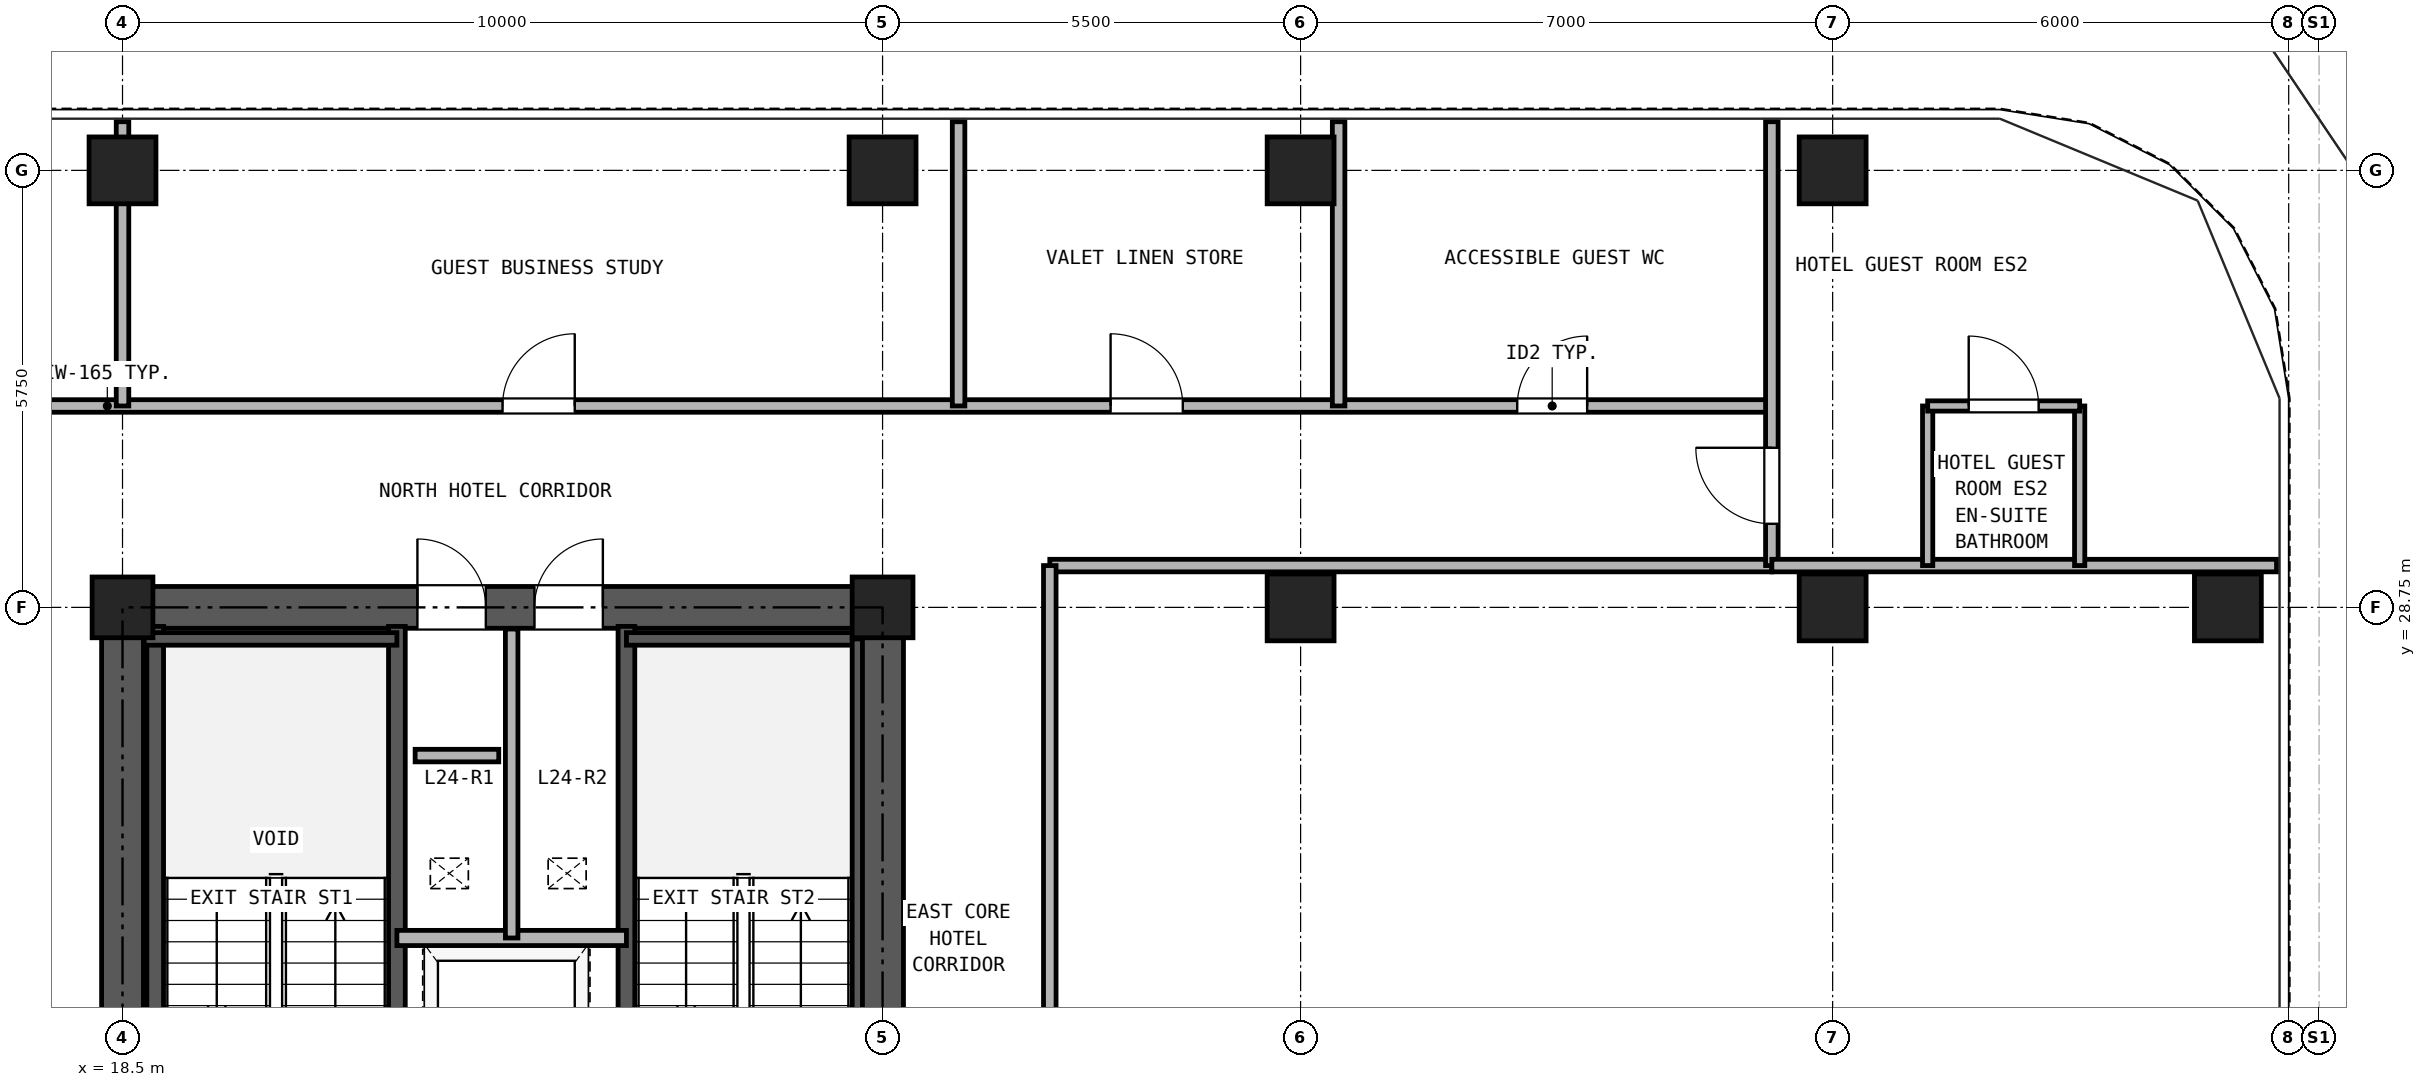
"""IFC4 building model, lengths in metres.
Left out: names, types, materials, properties, quantities, classifications, styles, units other than length and angle.
Written with IfcOpenShell. Run it as: python <this file> out.ifc"""

import sys

from ifc_helpers import new_model, si_unit, direction, frame, frame_2d, origin, origin_2d, place, context, subcontext, project, spatial, rectangle, hollow_rectangle, extrude, source, transform, mapped, element, fill, save


model = new_model("IFC4")
c1 = context("Model", 3, precision=1e-05, world=origin(), true_north=direction((0.0, 1.0)))
c2 = subcontext(c1, "Body", "Model", "MODEL_VIEW")
j1 = project(units=[si_unit("LENGTHUNIT", "METRE"), si_unit("PLANEANGLEUNIT", "RADIAN")], contexts=[c1])
p1 = place(None, origin())
s1 = spatial("IfcSite", under=j1, at=p1, CompositionType="ELEMENT")
p2 = place(p1, origin())
s2 = spatial("IfcBuilding", under=s1, at=p2, CompositionType="ELEMENT")
p3 = place(p2, frame((0.0, 0.0, 92.7)))
s3 = spatial("IfcBuildingStorey", under=s2, at=p3, CompositionType="ELEMENT", Elevation=92.7)
m1 = source(origin(), c2, "Body", "SweptSolid", [
    extrude(hollow_rectangle(XDim=0.88, YDim=0.88, WallThickness=0.05, at=origin_2d()), origin(), (0.0, 0.0, 1.0), 2.95),
])
for number, where, z_axis, x_axis in (
    (1, (18.5, 34.5, 0.0), (0.0, 0.0, 1.0), (1.0, 0.0, 0.0)),
    (2, (28.5, 34.5, 0.0), (0.0, 0.0, 1.0), (1.0, 0.0, 0.0)),
    (3, (34.0, 34.5, 0.0), (0.0, 0.0, 1.0), (1.0, 0.0, 0.0)),
    (4, (41.0, 34.5, 0.0), (0.0, 0.0, 1.0), (1.0, 0.0, 0.0)),
    (5, (46.2, 28.75, 0.0), (0.0, 0.0, 1.0), (1.0, 0.0, 0.0)),
):
    element("IfcColumn", number, at=place(p3, frame(where, z_axis=z_axis, x_axis=x_axis)), inside=s3, PredefinedType="COLUMN", context=c2, shape_type="MappedRepresentation", body=[
        mapped(m1, transform((0.0, 0.0, 0.0), x_axis=(1.0, 0.0, 0.0), y_axis=(0.0, 1.0, 0.0), z_axis=(0.0, 0.0, 1.0), scale=1.0)),
    ])
m2 = source(origin(), c2, "Body", "SweptSolid", [
    extrude(hollow_rectangle(XDim=0.8, YDim=0.8, WallThickness=0.045, at=origin_2d()), origin(), (0.0, 0.0, 1.0), 2.95),
])
for number, where, z_axis, x_axis in (
    (6, (18.5, 28.75, 0.0), (0.0, 0.0, 1.0), (1.0, 0.0, 0.0)),
    (7, (28.5, 28.75, 0.0), (0.0, 0.0, 1.0), (1.0, 0.0, 0.0)),
):
    element("IfcColumn", number, at=place(p3, frame(where, z_axis=z_axis, x_axis=x_axis)), inside=s3, PredefinedType="COLUMN", context=c2, shape_type="MappedRepresentation", body=[
        mapped(m2, transform((0.0, 0.0, 0.0), x_axis=(1.0, 0.0, 0.0), y_axis=(0.0, 1.0, 0.0), z_axis=(0.0, 0.0, 1.0), scale=1.0)),
    ])
for number, where, z_axis, x_axis in (
    (8, (34.0, 28.75, 0.0), (0.0, 0.0, 1.0), (1.0, 0.0, 0.0)),
    (9, (41.0, 28.75, 0.0), (0.0, 0.0, 1.0), (1.0, 0.0, 0.0)),
):
    element("IfcColumn", number, at=place(p3, frame(where, z_axis=z_axis, x_axis=x_axis)), inside=s3, PredefinedType="COLUMN", context=c2, shape_type="MappedRepresentation", body=[
        mapped(m1, transform((0.0, 0.0, 0.0), x_axis=(1.0, 0.0, 0.0), y_axis=(0.0, 1.0, 0.0), z_axis=(0.0, 0.0, 1.0), scale=1.0)),
    ])
p4 = place(p3, frame((18.225, 28.75, 0.0), z_axis=(0.0, 0.0, 1.0), x_axis=(1.0, 0.0, 0.0)))
e10 = element("IfcWall", 10, at=p4, inside=s3, PredefinedType="SHEAR", context=c2, shape_type="SweptSolid", body=[
    extrude(rectangle(XDim=10.55, YDim=0.55, at=frame_2d((5.275, 0.0))), origin(), (0.0, 0.0, 1.0), 2.95),
])
p5 = place(p4, frame((4.155, 0.0, 0.0)))
e11 = element("IfcOpeningElement", 11, at=p5, cuts=e10, PredefinedType="OPENING", context=c2, shape_type="SweptSolid", body=[
    extrude(rectangle(XDim=0.9, YDim=2.05, at=frame_2d((0.45, 1.025))), frame((0.0, 0.285, 0.0), z_axis=(0.0, -1.0, 0.0), x_axis=(1.0, 0.0, 0.0)), (0.0, 0.0, 1.0), 0.57),
])
p6 = place(p4, frame((5.695, 0.0, 0.0)))
e12 = element("IfcOpeningElement", 12, at=p6, cuts=e10, PredefinedType="OPENING", context=c2, shape_type="SweptSolid", body=[
    extrude(rectangle(XDim=0.9, YDim=2.05, at=frame_2d((0.45, 1.025))), frame((0.0, 0.285, 0.0), z_axis=(0.0, -1.0, 0.0), x_axis=(1.0, 0.0, 0.0)), (0.0, 0.0, 1.0), 0.57),
])
p7 = place(p3, frame((18.5, 11.775, 0.0), z_axis=(0.0, 0.0, 1.0), x_axis=(0.0, 1.0, 0.0)))
e13 = element("IfcWall", 13, at=p7, inside=s3, PredefinedType="SHEAR", context=c2, shape_type="SweptSolid", body=[
    extrude(rectangle(XDim=16.7, YDim=0.55, at=frame_2d((8.35, 0.0))), origin(), (0.0, 0.0, 1.0), 2.95),
])
p8 = place(p7, frame((7.375, 0.0, 0.0)))
e14 = element("IfcOpeningElement", 14, at=p8, cuts=e13, PredefinedType="OPENING", context=c2, shape_type="SweptSolid", body=[
    extrude(rectangle(XDim=1.15, YDim=2.2, at=frame_2d((0.575, 1.1))), frame((0.0, 0.285, 0.0), z_axis=(0.0, -1.0, 0.0), x_axis=(1.0, 0.0, 0.0)), (0.0, 0.0, 1.0), 0.57),
])
p9 = place(p3, frame((28.5, 11.775, 0.0), z_axis=(0.0, 0.0, 1.0), x_axis=(0.0, 1.0, 0.0)))
e15 = element("IfcWall", 15, at=p9, inside=s3, PredefinedType="SHEAR", context=c2, shape_type="SweptSolid", body=[
    extrude(rectangle(XDim=16.7, YDim=0.55, at=frame_2d((8.35, 0.0))), origin(), (0.0, 0.0, 1.0), 2.95),
])
p10 = place(p9, frame((7.375, 0.0, 0.0)))
e16 = element("IfcOpeningElement", 16, at=p10, cuts=e15, PredefinedType="OPENING", context=c2, shape_type="SweptSolid", body=[
    extrude(rectangle(XDim=1.15, YDim=2.2, at=frame_2d((0.575, 1.1))), frame((0.0, 0.285, 0.0), z_axis=(0.0, -1.0, 0.0), x_axis=(1.0, 0.0, 0.0)), (0.0, 0.0, 1.0), 0.57),
])
for number, where, z_axis, x_axis in (
    (17, (18.93, 21.39, 0.0), (0.0, 0.0, 1.0), (0.0, 1.0, 0.0)),
    (18, (22.11, 21.39, 0.0), (0.0, 0.0, 1.0), (0.0, 1.0, 0.0)),
    (19, (25.13, 21.39, 0.0), (0.0, 0.0, 1.0), (0.0, 1.0, 0.0)),
):
    element("IfcWall", number, at=place(p3, frame(where, z_axis=z_axis, x_axis=x_axis)), inside=s3, PredefinedType="SOLIDWALL", context=c2, shape_type="SweptSolid", body=[
        extrude(rectangle(XDim=7.11, YDim=0.22, at=frame_2d((3.555, 0.0))), origin(), (0.0, 0.0, 1.0), 2.95),
    ])
p11 = place(p3, frame((18.785, 28.335, 0.0), z_axis=(0.0, 0.0, 1.0), x_axis=(1.0, 0.0, 0.0)))
e20 = element("IfcWall", 20, at=p11, inside=s3, PredefinedType="PARTITIONING", context=c2, shape_type="SweptSolid", body=[
    extrude(rectangle(XDim=3.325, YDim=0.165, at=frame_2d((1.663, 0.0))), origin(), (0.0, 0.0, 1.0), 2.95),
])
p12 = place(p3, frame((25.13, 28.335, 0.0), z_axis=(0.0, 0.0, 1.0), x_axis=(1.0, 0.0, 0.0)))
e21 = element("IfcWall", 21, at=p12, inside=s3, PredefinedType="PARTITIONING", context=c2, shape_type="SweptSolid", body=[
    extrude(rectangle(XDim=3.085, YDim=0.165, at=frame_2d((1.542, 0.0))), origin(), (0.0, 0.0, 1.0), 2.95),
])
p13 = place(p3, frame((28.167, 21.39, 0.0), z_axis=(0.0, 0.0, 1.0), x_axis=(0.0, 1.0, 0.0)))
e22 = element("IfcWall", 22, at=p13, inside=s3, PredefinedType="PARTITIONING", context=c2, shape_type="SweptSolid", body=[
    extrude(rectangle(XDim=6.945, YDim=0.135, at=frame_2d((3.473, 0.0))), origin(), (0.0, 0.0, 1.0), 2.95),
])
p14 = place(p3, frame((22.11, 24.4, 0.0), z_axis=(0.0, 0.0, 1.0), x_axis=(1.0, 0.0, 0.0)))
e23 = element("IfcWall", 23, at=p14, inside=s3, PredefinedType="PARTITIONING", context=c2, shape_type="SweptSolid", body=[
    extrude(rectangle(XDim=3.02, YDim=0.2, at=frame_2d((1.51, 0.0))), origin(), (0.0, 0.0, 1.0), 2.95),
])
p15 = place(p3, frame((23.62, 24.4, 0.0), z_axis=(0.0, 0.0, 1.0), x_axis=(0.0, 1.0, 0.0)))
e24 = element("IfcWall", 24, at=p15, inside=s3, PredefinedType="PARTITIONING", context=c2, shape_type="SweptSolid", body=[
    extrude(rectangle(XDim=4.065, YDim=0.165, at=frame_2d((2.033, 0.0))), origin(), (0.0, 0.0, 1.0), 2.95),
])
p16 = place(p3, frame((6.8, 31.4, 0.0), z_axis=(0.0, 0.0, 1.0), x_axis=(1.0, 0.0, 0.0)))
e25 = element("IfcWall", 25, at=p16, inside=s3, PredefinedType="PARTITIONING", context=c2, shape_type="SweptSolid", body=[
    extrude(rectangle(XDim=33.4, YDim=0.165, at=frame_2d((16.7, 0.0))), origin(), (0.0, 0.0, 1.0), 2.583),
])
p17 = place(p16, frame((5.35, 0.0, 0.0)))
e26 = element("IfcOpeningElement", 26, at=p17, cuts=e25, PredefinedType="OPENING", context=c2, shape_type="SweptSolid", body=[
    extrude(rectangle(XDim=0.95, YDim=2.15, at=frame_2d((0.475, 1.075))), frame((0.0, 0.093, 0.0), z_axis=(0.0, -1.0, 0.0), x_axis=(1.0, 0.0, 0.0)), (0.0, 0.0, 1.0), 0.185),
])
p18 = place(p16, frame((16.7, 0.0, 0.0)))
e27 = element("IfcOpeningElement", 27, at=p18, cuts=e25, PredefinedType="OPENING", context=c2, shape_type="SweptSolid", body=[
    extrude(rectangle(XDim=0.95, YDim=2.15, at=frame_2d((0.475, 1.075))), frame((0.0, 0.093, 0.0), z_axis=(0.0, -1.0, 0.0), x_axis=(1.0, 0.0, 0.0)), (0.0, 0.0, 1.0), 0.185),
])
p19 = place(p16, frame((24.7, 0.0, 0.0)))
e28 = element("IfcOpeningElement", 28, at=p19, cuts=e25, PredefinedType="OPENING", context=c2, shape_type="SweptSolid", body=[
    extrude(rectangle(XDim=0.95, YDim=2.15, at=frame_2d((0.475, 1.075))), frame((0.0, 0.093, 0.0), z_axis=(0.0, -1.0, 0.0), x_axis=(1.0, 0.0, 0.0)), (0.0, 0.0, 1.0), 0.185),
])
p20 = place(p16, frame((30.05, 0.0, 0.0)))
e29 = element("IfcOpeningElement", 29, at=p20, cuts=e25, PredefinedType="OPENING", context=c2, shape_type="SweptSolid", body=[
    extrude(rectangle(XDim=0.92, YDim=2.1, at=frame_2d((0.46, 1.05))), frame((0.0, 0.093, 0.0), z_axis=(0.0, -1.0, 0.0), x_axis=(1.0, 0.0, 0.0)), (0.0, 0.0, 1.0), 0.185),
])
p21 = place(p3, frame((30.7, 29.3, 0.0), z_axis=(0.0, 0.0, 1.0), x_axis=(1.0, 0.0, 0.0)))
e30 = element("IfcWall", 30, at=p21, inside=s3, PredefinedType="PARTITIONING", context=c2, shape_type="SweptSolid", body=[
    extrude(rectangle(XDim=9.5, YDim=0.165, at=frame_2d((4.75, 0.0))), origin(), (0.0, 0.0, 1.0), 2.95),
])
p22 = place(p3, frame((30.7, 11.05, 0.0), z_axis=(0.0, 0.0, 1.0), x_axis=(0.0, 1.0, 0.0)))
e31 = element("IfcWall", 31, at=p22, inside=s3, PredefinedType="PARTITIONING", context=c2, shape_type="SweptSolid", body=[
    extrude(rectangle(XDim=18.25, YDim=0.165, at=frame_2d((9.125, 0.0))), origin(), (0.0, 0.0, 1.0), 2.95),
])
p23 = place(p22, frame((8.625, 0.0, 0.0)))
e32 = element("IfcOpeningElement", 32, at=p23, cuts=e31, PredefinedType="OPENING", context=c2, shape_type="SweptSolid", body=[
    extrude(rectangle(XDim=0.95, YDim=2.15, at=frame_2d((0.475, 1.075))), frame((0.0, 0.093, 0.0), z_axis=(0.0, -1.0, 0.0), x_axis=(1.0, 0.0, 0.0)), (0.0, 0.0, 1.0), 0.185),
])
p24 = place(p3, frame((40.2, 29.3, 0.0), z_axis=(0.0, 0.0, 1.0), x_axis=(0.0, 1.0, 0.0)))
e33 = element("IfcWall", 33, at=p24, inside=s3, PredefinedType="PARTITIONING", context=c2, shape_type="SweptSolid", body=[
    extrude(rectangle(XDim=5.84, YDim=0.165, at=frame_2d((2.92, 0.0))), origin(), (0.0, 0.0, 1.0), 2.95),
])
p25 = place(p24, frame((0.55, 0.0, 0.0)))
e34 = element("IfcOpeningElement", 34, at=p25, cuts=e33, PredefinedType="OPENING", context=c2, shape_type="SweptSolid", body=[
    extrude(rectangle(XDim=1.0, YDim=2.15, at=frame_2d((0.5, 1.075))), frame((0.0, 0.093, 0.0), z_axis=(0.0, -1.0, 0.0), x_axis=(1.0, 0.0, 0.0)), (0.0, 0.0, 1.0), 0.185),
])
p26 = place(p3, frame((40.2, 29.3, 0.0), z_axis=(0.0, 0.0, 1.0), x_axis=(1.0, 0.0, 0.0)))
e35 = element("IfcWall", 35, at=p26, inside=s3, PredefinedType="PARTITIONING", context=c2, shape_type="SweptSolid", body=[
    extrude(rectangle(XDim=6.64, YDim=0.165, at=frame_2d((3.32, 0.0))), origin(), (0.0, 0.0, 1.0), 2.95),
])
for number, where, z_axis, x_axis in (
    (36, (42.25, 29.3, 0.0), (0.0, 0.0, 1.0), (0.0, 1.0, 0.0)),
    (37, (44.25, 29.3, 0.0), (0.0, 0.0, 1.0), (0.0, 1.0, 0.0)),
):
    element("IfcWall", number, at=place(p3, frame(where, z_axis=z_axis, x_axis=x_axis)), inside=s3, PredefinedType="PARTITIONING", context=c2, shape_type="SweptSolid", body=[
        extrude(rectangle(XDim=2.1, YDim=0.135, at=frame_2d((1.05, 0.0))), origin(), (0.0, 0.0, 1.0), 2.95),
    ])
p27 = place(p3, frame((42.25, 31.4, 0.0), z_axis=(0.0, 0.0, 1.0), x_axis=(1.0, 0.0, 0.0)))
e38 = element("IfcWall", 38, at=p27, inside=s3, PredefinedType="PARTITIONING", context=c2, shape_type="SweptSolid", body=[
    extrude(rectangle(XDim=2.0, YDim=0.135, at=frame_2d((1.0, 0.0))), origin(), (0.0, 0.0, 1.0), 2.95),
])
p28 = place(p27, frame((0.54, 0.0, 0.0)))
e39 = element("IfcOpeningElement", 39, at=p28, cuts=e38, PredefinedType="OPENING", context=c2, shape_type="SweptSolid", body=[
    extrude(rectangle(XDim=0.92, YDim=2.1, at=frame_2d((0.46, 1.05))), frame((0.0, 0.077, 0.0), z_axis=(0.0, -1.0, 0.0), x_axis=(1.0, 0.0, 0.0)), (0.0, 0.0, 1.0), 0.155),
])
p29 = place(p3, frame((18.5, 31.4, 0.0), z_axis=(0.0, 0.0, 1.0), x_axis=(0.0, 1.0, 0.0)))
e40 = element("IfcWall", 40, at=p29, inside=s3, PredefinedType="PARTITIONING", context=c2, shape_type="SweptSolid", body=[
    extrude(rectangle(XDim=3.74, YDim=0.165, at=frame_2d((1.87, 0.0))), origin(), (0.0, 0.0, 1.0), 2.247),
])
for number, where, z_axis, x_axis in (
    (41, (29.5, 31.4, 0.0), (0.0, 0.0, 1.0), (0.0, 1.0, 0.0)),
    (42, (34.5, 31.4, 0.0), (0.0, 0.0, 1.0), (0.0, 1.0, 0.0)),
):
    element("IfcWall", number, at=place(p3, frame(where, z_axis=z_axis, x_axis=x_axis)), inside=s3, PredefinedType="PARTITIONING", context=c2, shape_type="SweptSolid", body=[
        extrude(rectangle(XDim=3.74, YDim=0.165, at=frame_2d((1.87, 0.0))), origin(), (0.0, 0.0, 1.0), 2.95),
    ])
p30 = place(p3, frame((22.35, 26.8, 0.0), z_axis=(0.0, 0.0, 1.0), x_axis=(1.0, 0.0, 0.0)))
e43 = element("IfcWall", 43, at=p30, inside=s3, PredefinedType="PARTITIONING", context=c2, shape_type="SweptSolid", body=[
    extrude(rectangle(XDim=1.1, YDim=0.165, at=frame_2d((0.55, 0.0))), origin(), (0.0, 0.0, 1.0), 2.95),
])
p31 = place(p5, origin())
e44 = element("IfcDoor", 44, at=p31, inside=s3, OperationType="SINGLE_SWING_LEFT", PredefinedType="DOOR", context=c2, shape_type="SweptSolid", body=[
    extrude(rectangle(XDim=0.9, YDim=2.05, at=frame_2d((0.45, 1.025))), frame((0.0, 0.025, 0.0), z_axis=(0.0, -1.0, 0.0), x_axis=(1.0, 0.0, 0.0)), (0.0, 0.0, 1.0), 0.05),
])
fill(e11, e44)
p32 = place(p6, origin())
e45 = element("IfcDoor", 45, at=p32, inside=s3, OperationType="SINGLE_SWING_RIGHT", PredefinedType="DOOR", context=c2, shape_type="SweptSolid", body=[
    extrude(rectangle(XDim=0.9, YDim=2.05, at=frame_2d((0.45, 1.025))), frame((0.0, 0.025, 0.0), z_axis=(0.0, -1.0, 0.0), x_axis=(1.0, 0.0, 0.0)), (0.0, 0.0, 1.0), 0.05),
])
fill(e12, e45)
p33 = place(p28, frame((0.92, 0.0, 0.0), z_axis=(0.0, 0.0, 1.0), x_axis=(-1.0, 0.0, 0.0)))
e46 = element("IfcDoor", 46, at=p33, inside=s3, OperationType="SINGLE_SWING_LEFT", PredefinedType="DOOR", context=c2, shape_type="SweptSolid", body=[
    extrude(rectangle(XDim=0.92, YDim=2.1, at=frame_2d((0.46, 1.05))), frame((0.0, 0.025, 0.0), z_axis=(0.0, -1.0, 0.0), x_axis=(1.0, 0.0, 0.0)), (0.0, 0.0, 1.0), 0.05),
])
fill(e39, e46)
p34 = place(p25, frame((1.0, 0.0, 0.0), z_axis=(0.0, 0.0, 1.0), x_axis=(-1.0, 0.0, 0.0)))
e47 = element("IfcDoor", 47, at=p34, inside=s3, OperationType="SINGLE_SWING_RIGHT", PredefinedType="DOOR", context=c2, shape_type="SweptSolid", body=[
    extrude(rectangle(XDim=1.0, YDim=2.15, at=frame_2d((0.5, 1.075))), frame((0.0, 0.025, 0.0), z_axis=(0.0, -1.0, 0.0), x_axis=(1.0, 0.0, 0.0)), (0.0, 0.0, 1.0), 0.05),
])
fill(e34, e47)
p35 = place(p18, origin())
e48 = element("IfcDoor", 48, at=p35, inside=s3, OperationType="SINGLE_SWING_RIGHT", PredefinedType="DOOR", context=c2, shape_type="SweptSolid", body=[
    extrude(rectangle(XDim=0.95, YDim=2.15, at=frame_2d((0.475, 1.075))), frame((0.0, 0.025, 0.0), z_axis=(0.0, -1.0, 0.0), x_axis=(1.0, 0.0, 0.0)), (0.0, 0.0, 1.0), 0.05),
])
fill(e27, e48)
p36 = place(p19, origin())
e49 = element("IfcDoor", 49, at=p36, inside=s3, OperationType="SINGLE_SWING_LEFT", PredefinedType="DOOR", context=c2, shape_type="SweptSolid", body=[
    extrude(rectangle(XDim=0.95, YDim=2.15, at=frame_2d((0.475, 1.075))), frame((0.0, 0.025, 0.0), z_axis=(0.0, -1.0, 0.0), x_axis=(1.0, 0.0, 0.0)), (0.0, 0.0, 1.0), 0.05),
])
fill(e28, e49)
p37 = place(p20, origin())
e50 = element("IfcDoor", 50, at=p37, inside=s3, OperationType="SINGLE_SWING_RIGHT", PredefinedType="DOOR", context=c2, shape_type="SweptSolid", body=[
    extrude(rectangle(XDim=0.92, YDim=2.1, at=frame_2d((0.46, 1.05))), frame((0.0, 0.025, 0.0), z_axis=(0.0, -1.0, 0.0), x_axis=(1.0, 0.0, 0.0)), (0.0, 0.0, 1.0), 0.05),
])
fill(e29, e50)
save(model, sys.argv[1])
